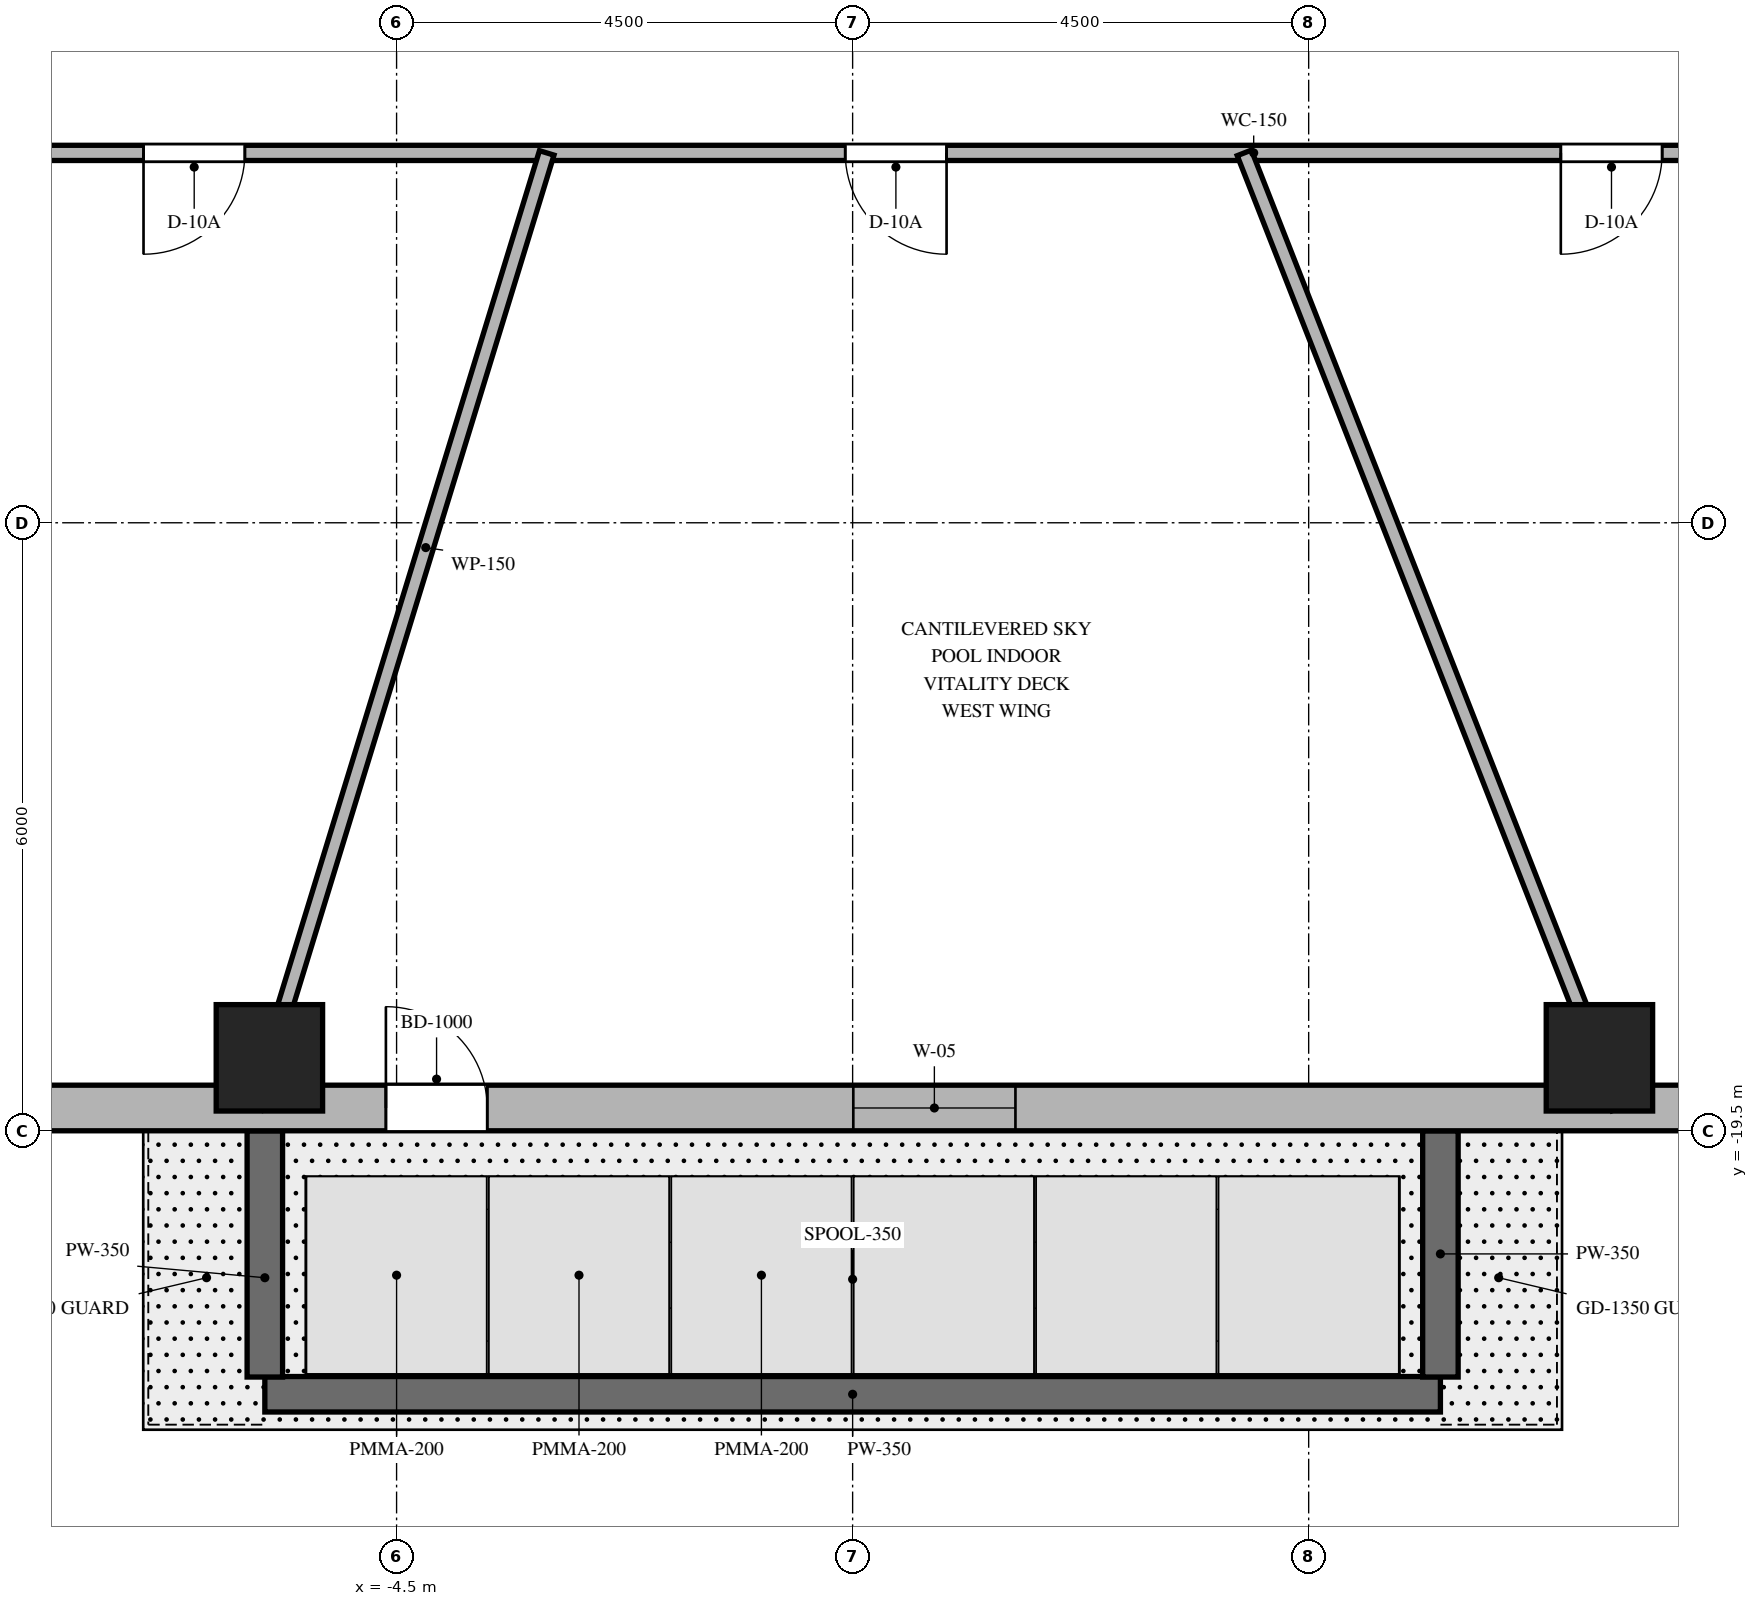
"""IFC4 building model, lengths in metres.
Left out: names, types, materials, properties, quantities, classifications, styles, units other than length and angle.
Written with IfcOpenShell. Run it as: python <this file> out.ifc"""

import sys

from ifc_helpers import new_model, si_unit, direction, frame, frame_2d, origin, origin_2d, place, context, subcontext, project, spatial, rectangle, extrude, element, fill, save


model = new_model("IFC4")
c1 = context("Model", 3, precision=1e-05, world=origin(), true_north=direction((0.0, 1.0)))
c2 = subcontext(c1, "Body", "Model", "MODEL_VIEW")
j1 = project(units=[si_unit("LENGTHUNIT", "METRE"), si_unit("PLANEANGLEUNIT", "RADIAN")], contexts=[c1])
p1 = place(None, origin())
s1 = spatial("IfcSite", under=j1, at=p1, CompositionType="ELEMENT")
p2 = place(p1, origin())
s2 = spatial("IfcBuilding", under=s1, at=p2, CompositionType="ELEMENT")
p3 = place(p2, frame((0.0, 0.0, 201.5)))
s3 = spatial("IfcBuildingStorey", under=s2, at=p3, CompositionType="ELEMENT", Elevation=201.5)
for number, where, z_axis, x_axis in (
    (1, (-5.755, -18.78, 0.0), (0.0, 0.0, 1.0), (1.0, 0.0, 0.0)),
    (2, (7.369, -18.78, 0.0), (0.0, 0.0, 1.0), (1.0, 0.0, 0.0)),
):
    element("IfcColumn", number, at=place(p3, frame(where, z_axis=z_axis, x_axis=x_axis)), inside=s3, PredefinedType="COLUMN", context=c2, shape_type="SweptSolid", body=[
        extrude(rectangle(XDim=1.05, YDim=1.05, at=origin_2d()), origin(), (0.0, 0.0, 1.0), 5.0),
    ])
p4 = place(p3, frame((-5.8, -22.1, 0.0), z_axis=(0.0, 0.0, 1.0), x_axis=(1.0, 0.0, 0.0)))
e3 = element("IfcWall", 3, at=p4, inside=s3, PredefinedType="SOLIDWALL", context=c2, shape_type="SweptSolid", body=[
    extrude(rectangle(XDim=11.6, YDim=0.35, at=frame_2d((5.8, 0.0))), origin(), (0.0, 0.0, 1.0), 1.42),
])
for number, where, z_axis, x_axis in (
    (4, (-5.8, -21.93, 0.0), (0.0, 0.0, 1.0), (0.0, 1.0, 0.0)),
    (5, (5.8, -21.93, 0.0), (0.0, 0.0, 1.0), (0.0, 1.0, 0.0)),
):
    element("IfcWall", number, at=place(p3, frame(where, z_axis=z_axis, x_axis=x_axis)), inside=s3, PredefinedType="SOLIDWALL", context=c2, shape_type="SweptSolid", body=[
        extrude(rectangle(XDim=2.43, YDim=0.35, at=frame_2d((1.215, 0.0))), origin(), (0.0, 0.0, 1.0), 1.42),
    ])
p5 = place(p3, frame((-10.108, -19.275, 0.0), z_axis=(0.0, 0.0, 1.0), x_axis=(1.0, 0.0, 0.0)))
e6 = element("IfcWall", 6, at=p5, inside=s3, PredefinedType="SOLIDWALL", context=c2, shape_type="SweptSolid", body=[
    extrude(rectangle(XDim=21.829, YDim=0.45, at=frame_2d((10.915, 0.0))), origin(), (0.0, 0.0, 1.0), 4.7),
])
p6 = place(p5, frame((5.503, 0.0, 0.0)))
e7 = element("IfcOpeningElement", 7, at=p6, cuts=e6, PredefinedType="OPENING", context=c2, shape_type="SweptSolid", body=[
    extrude(rectangle(XDim=1.0, YDim=2.15, at=frame_2d((0.5, 1.075))), frame((0.0, 0.235, 0.0), z_axis=(0.0, -1.0, 0.0), x_axis=(1.0, 0.0, 0.0)), (0.0, 0.0, 1.0), 0.47),
])
p7 = place(p5, frame((10.115, 0.0, 0.8)))
e8 = element("IfcOpeningElement", 8, at=p7, cuts=e6, PredefinedType="OPENING", context=c2, shape_type="SweptSolid", body=[
    extrude(rectangle(XDim=1.6, YDim=1.75, at=frame_2d((0.8, 0.875))), frame((0.0, 0.235, 0.0), z_axis=(0.0, -1.0, 0.0), x_axis=(1.0, 0.0, 0.0)), (0.0, 0.0, 1.0), 0.47),
])
p8 = place(p5, frame((18.933, 0.0, 0.8)))
e9 = element("IfcOpeningElement", 9, at=p8, cuts=e6, PredefinedType="OPENING", context=c2, shape_type="SweptSolid", body=[
    extrude(rectangle(XDim=1.6, YDim=1.75, at=frame_2d((0.8, 0.875))), frame((0.0, 0.235, 0.0), z_axis=(0.0, -1.0, 0.0), x_axis=(1.0, 0.0, 0.0)), (0.0, 0.0, 1.0), 0.47),
])
p9 = place(p3, frame((11.35, -9.85, 0.0), z_axis=(0.0, 0.0, 1.0), x_axis=(-1.0, 0.0, 0.0)))
e10 = element("IfcWall", 10, at=p9, inside=s3, PredefinedType="PARTITIONING", context=c2, shape_type="SweptSolid", body=[
    extrude(rectangle(XDim=22.7, YDim=0.15, at=frame_2d((11.35, 0.0))), origin(), (0.0, 0.0, 1.0), 2.89),
])
p10 = place(p9, frame((17.347, 0.0, 0.0)))
e11 = element("IfcOpeningElement", 11, at=p10, cuts=e10, PredefinedType="OPENING", context=c2, shape_type="SweptSolid", body=[
    extrude(rectangle(XDim=1.0, YDim=2.03, at=frame_2d((0.5, 1.015))), frame((0.0, 0.085, 0.0), z_axis=(0.0, -1.0, 0.0), x_axis=(1.0, 0.0, 0.0)), (0.0, 0.0, 1.0), 0.17),
])
p11 = place(p9, frame((10.423, 0.0, 0.0)))
e12 = element("IfcOpeningElement", 12, at=p11, cuts=e10, PredefinedType="OPENING", context=c2, shape_type="SweptSolid", body=[
    extrude(rectangle(XDim=1.0, YDim=2.03, at=frame_2d((0.5, 1.015))), frame((0.0, 0.085, 0.0), z_axis=(0.0, -1.0, 0.0), x_axis=(1.0, 0.0, 0.0)), (0.0, 0.0, 1.0), 0.17),
])
p12 = place(p9, frame((3.362, 0.0, 0.0)))
e13 = element("IfcOpeningElement", 13, at=p12, cuts=e10, PredefinedType="OPENING", context=c2, shape_type="SweptSolid", body=[
    extrude(rectangle(XDim=1.0, YDim=2.03, at=frame_2d((0.5, 1.015))), frame((0.0, 0.085, 0.0), z_axis=(0.0, -1.0, 0.0), x_axis=(1.0, 0.0, 0.0)), (0.0, 0.0, 1.0), 0.17),
])
p13 = place(p3, frame((-3.019, -9.85, 0.0), z_axis=(0.0, 0.0, 1.0), x_axis=(-0.292996168014, -0.956113615387, 0.0)))
e14 = element("IfcWall", 14, at=p13, inside=s3, PredefinedType="PARTITIONING", context=c2, shape_type="SweptSolid", body=[
    extrude(rectangle(XDim=9.857, YDim=0.15, at=frame_2d((4.929, 0.0))), origin(), (0.0, 0.0, 1.0), 2.89),
])
p14 = place(p3, frame((3.865, -9.85, 0.0), z_axis=(0.0, 0.0, 1.0), x_axis=(0.365279308356, -0.930897968033, 0.0)))
e15 = element("IfcWall", 15, at=p14, inside=s3, PredefinedType="PARTITIONING", context=c2, shape_type="SweptSolid", body=[
    extrude(rectangle(XDim=10.125, YDim=0.15, at=frame_2d((5.062, 0.0))), origin(), (0.0, 0.0, 1.0), 2.89),
])
p15 = place(p6, origin())
e16 = element("IfcDoor", 16, at=p15, inside=s3, OperationType="SINGLE_SWING_LEFT", PredefinedType="DOOR", context=c2, shape_type="SweptSolid", body=[
    extrude(rectangle(XDim=1.0, YDim=2.15, at=frame_2d((0.5, 1.075))), frame((0.0, 0.025, 0.0), z_axis=(0.0, -1.0, 0.0), x_axis=(1.0, 0.0, 0.0)), (0.0, 0.0, 1.0), 0.05),
])
fill(e7, e16)
p16 = place(p7, origin())
e17 = element("IfcWindow", 17, at=p16, inside=s3, PartitioningType="SINGLE_PANEL", PredefinedType="WINDOW", context=c2, shape_type="SweptSolid", body=[
    extrude(rectangle(XDim=1.6, YDim=1.75, at=frame_2d((0.8, 0.875))), frame((0.0, 0.03, 0.0), z_axis=(0.0, -1.0, 0.0), x_axis=(1.0, 0.0, 0.0)), (0.0, 0.0, 1.0), 0.06),
])
fill(e8, e17)
p17 = place(p10, origin())
e18 = element("IfcDoor", 18, at=p17, inside=s3, OperationType="SINGLE_SWING_RIGHT", PredefinedType="DOOR", context=c2, shape_type="SweptSolid", body=[
    extrude(rectangle(XDim=1.0, YDim=2.03, at=frame_2d((0.5, 1.015))), frame((0.0, 0.025, 0.0), z_axis=(0.0, -1.0, 0.0), x_axis=(1.0, 0.0, 0.0)), (0.0, 0.0, 1.0), 0.05),
])
fill(e11, e18)
p18 = place(p11, origin())
e19 = element("IfcDoor", 19, at=p18, inside=s3, OperationType="SINGLE_SWING_LEFT", PredefinedType="DOOR", context=c2, shape_type="SweptSolid", body=[
    extrude(rectangle(XDim=1.0, YDim=2.03, at=frame_2d((0.5, 1.015))), frame((0.0, 0.025, 0.0), z_axis=(0.0, -1.0, 0.0), x_axis=(1.0, 0.0, 0.0)), (0.0, 0.0, 1.0), 0.05),
])
fill(e12, e19)
p19 = place(p12, origin())
e20 = element("IfcDoor", 20, at=p19, inside=s3, OperationType="SINGLE_SWING_RIGHT", PredefinedType="DOOR", context=c2, shape_type="SweptSolid", body=[
    extrude(rectangle(XDim=1.0, YDim=2.03, at=frame_2d((0.5, 1.015))), frame((0.0, 0.025, 0.0), z_axis=(0.0, -1.0, 0.0), x_axis=(1.0, 0.0, 0.0)), (0.0, 0.0, 1.0), 0.05),
])
fill(e13, e20)
save(model, sys.argv[1])
